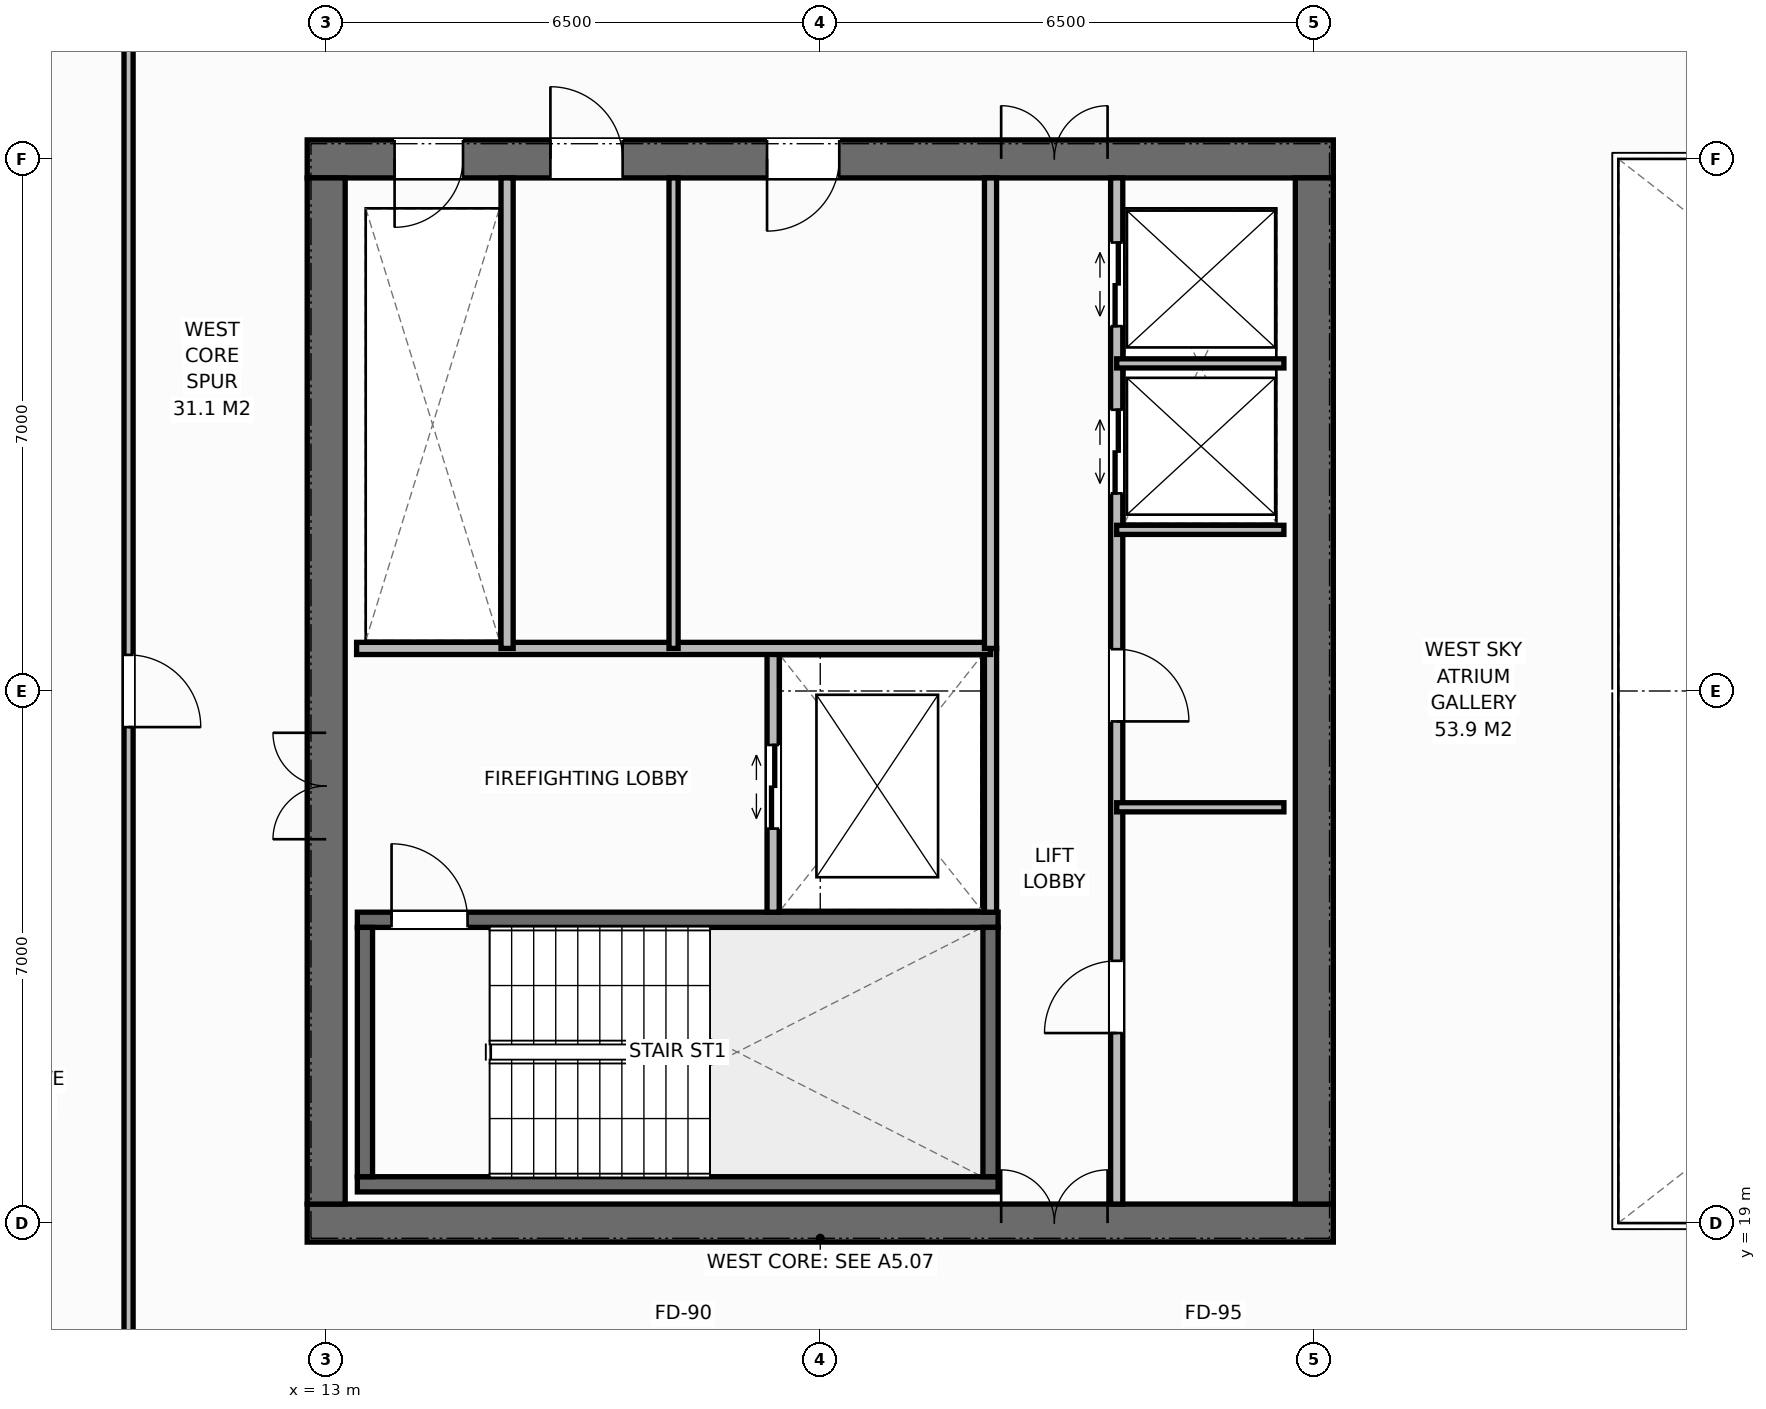
"""IFC4 building model, lengths in metres.
Left out: names, types, materials, properties, quantities, classifications, styles, units other than length and angle.
Written with IfcOpenShell. Run it as: python <this file> out.ifc"""

import sys

from ifc_helpers import new_model, si_unit, direction, frame, frame_2d, origin, place, context, subcontext, project, spatial, rectangle, extrude, element, fill, save


model = new_model("IFC4")
c1 = context("Model", 3, precision=1e-05, world=origin(), true_north=direction((0.0, 1.0)))
c2 = subcontext(c1, "Body", "Model", "MODEL_VIEW")
j1 = project(units=[si_unit("LENGTHUNIT", "METRE"), si_unit("PLANEANGLEUNIT", "RADIAN")], contexts=[c1])
p1 = place(None, origin())
s1 = spatial("IfcSite", under=j1, at=p1, CompositionType="ELEMENT")
p2 = place(p1, origin())
s2 = spatial("IfcBuilding", under=s1, at=p2, CompositionType="ELEMENT")
p3 = place(p2, frame((0.0, 0.0, 274.6)))
s3 = spatial("IfcBuildingStorey", under=s2, at=p3, CompositionType="ELEMENT", Elevation=274.6)
p4 = place(p3, frame((12.75, 19.0, 0.0), z_axis=(0.0, 0.0, 1.0), x_axis=(1.0, 0.0, 0.0)))
e1 = element("IfcWall", 1, at=p4, inside=s3, PredefinedType="SHEAR", context=c2, shape_type="SweptSolid", body=[
    extrude(rectangle(XDim=13.5, YDim=0.5, at=frame_2d((6.75, 0.0))), origin(), (0.0, 0.0, 1.0), 3.8),
])
p5 = place(p4, frame((9.13, 0.0, 0.0)))
e2 = element("IfcOpeningElement", 2, at=p5, cuts=e1, PredefinedType="OPENING", context=c2, shape_type="SweptSolid", body=[
    extrude(rectangle(XDim=1.4, YDim=2.2, at=frame_2d((0.7, 1.1))), frame((0.0, 0.26, 0.0), z_axis=(0.0, -1.0, 0.0), x_axis=(1.0, 0.0, 0.0)), (0.0, 0.0, 1.0), 0.52),
])
p6 = place(p3, frame((12.75, 33.0, 0.0), z_axis=(0.0, 0.0, 1.0), x_axis=(1.0, 0.0, 0.0)))
e3 = element("IfcWall", 3, at=p6, inside=s3, PredefinedType="SHEAR", context=c2, shape_type="SweptSolid", body=[
    extrude(rectangle(XDim=13.5, YDim=0.5, at=frame_2d((6.75, 0.0))), origin(), (0.0, 0.0, 1.0), 3.8),
])
p7 = place(p6, frame((1.15, 0.0, 0.0)))
e4 = element("IfcOpeningElement", 4, at=p7, cuts=e3, PredefinedType="OPENING", context=c2, shape_type="SweptSolid", body=[
    extrude(rectangle(XDim=0.9, YDim=2.15, at=frame_2d((0.45, 1.075))), frame((0.0, 0.26, 0.0), z_axis=(0.0, -1.0, 0.0), x_axis=(1.0, 0.0, 0.0)), (0.0, 0.0, 1.0), 0.52),
])
p8 = place(p6, frame((3.2, 0.0, 0.0)))
e5 = element("IfcOpeningElement", 5, at=p8, cuts=e3, PredefinedType="OPENING", context=c2, shape_type="SweptSolid", body=[
    extrude(rectangle(XDim=0.95, YDim=2.15, at=frame_2d((0.475, 1.075))), frame((0.0, 0.26, 0.0), z_axis=(0.0, -1.0, 0.0), x_axis=(1.0, 0.0, 0.0)), (0.0, 0.0, 1.0), 0.52),
])
p9 = place(p6, frame((6.05, 0.0, 0.0)))
e6 = element("IfcOpeningElement", 6, at=p9, cuts=e3, PredefinedType="OPENING", context=c2, shape_type="SweptSolid", body=[
    extrude(rectangle(XDim=0.95, YDim=2.15, at=frame_2d((0.475, 1.075))), frame((0.0, 0.26, 0.0), z_axis=(0.0, -1.0, 0.0), x_axis=(1.0, 0.0, 0.0)), (0.0, 0.0, 1.0), 0.52),
])
p10 = place(p6, frame((9.13, 0.0, 0.0)))
e7 = element("IfcOpeningElement", 7, at=p10, cuts=e3, PredefinedType="OPENING", context=c2, shape_type="SweptSolid", body=[
    extrude(rectangle(XDim=1.4, YDim=2.2, at=frame_2d((0.7, 1.1))), frame((0.0, 0.26, 0.0), z_axis=(0.0, -1.0, 0.0), x_axis=(1.0, 0.0, 0.0)), (0.0, 0.0, 1.0), 0.52),
])
p11 = place(p3, frame((13.0, 19.25, 0.0), z_axis=(0.0, 0.0, 1.0), x_axis=(0.0, 1.0, 0.0)))
e8 = element("IfcWall", 8, at=p11, inside=s3, PredefinedType="SHEAR", context=c2, shape_type="SweptSolid", body=[
    extrude(rectangle(XDim=13.5, YDim=0.5, at=frame_2d((6.75, 0.0))), origin(), (0.0, 0.0, 1.0), 3.8),
])
p12 = place(p11, frame((4.8, 0.0, 0.0)))
e9 = element("IfcOpeningElement", 9, at=p12, cuts=e8, PredefinedType="OPENING", context=c2, shape_type="SweptSolid", body=[
    extrude(rectangle(XDim=1.4, YDim=2.2, at=frame_2d((0.7, 1.1))), frame((0.0, 0.26, 0.0), z_axis=(0.0, -1.0, 0.0), x_axis=(1.0, 0.0, 0.0)), (0.0, 0.0, 1.0), 0.52),
])
p13 = place(p3, frame((26.0, 19.25, 0.0), z_axis=(0.0, 0.0, 1.0), x_axis=(0.0, 1.0, 0.0)))
e10 = element("IfcWall", 10, at=p13, inside=s3, PredefinedType="SHEAR", context=c2, shape_type="SweptSolid", body=[
    extrude(rectangle(XDim=13.5, YDim=0.5, at=frame_2d((6.75, 0.0))), origin(), (0.0, 0.0, 1.0), 3.8),
])
p14 = place(p3, frame((13.41, 19.51, 0.0), z_axis=(0.0, 0.0, 1.0), x_axis=(1.0, 0.0, 0.0)))
e11 = element("IfcWall", 11, at=p14, inside=s3, PredefinedType="SHEAR", context=c2, shape_type="SweptSolid", body=[
    extrude(rectangle(XDim=8.43, YDim=0.2, at=frame_2d((4.215, 0.0))), origin(), (0.0, 0.0, 1.0), 3.8),
])
p15 = place(p3, frame((13.41, 22.99, 0.0), z_axis=(0.0, 0.0, 1.0), x_axis=(1.0, 0.0, 0.0)))
e12 = element("IfcWall", 12, at=p15, inside=s3, PredefinedType="SHEAR", context=c2, shape_type="SweptSolid", body=[
    extrude(rectangle(XDim=8.43, YDim=0.2, at=frame_2d((4.215, 0.0))), origin(), (0.0, 0.0, 1.0), 3.8),
])
p16 = place(p15, frame((0.45, 0.0, 0.0)))
e13 = element("IfcOpeningElement", 13, at=p16, cuts=e12, PredefinedType="OPENING", context=c2, shape_type="SweptSolid", body=[
    extrude(rectangle(XDim=1.0, YDim=2.15, at=frame_2d((0.5, 1.075))), frame((0.0, 0.11, 0.0), z_axis=(0.0, -1.0, 0.0), x_axis=(1.0, 0.0, 0.0)), (0.0, 0.0, 1.0), 0.22),
])
for number, where, z_axis, x_axis in (
    (14, (13.51, 19.61, 0.0), (0.0, 0.0, 1.0), (0.0, 1.0, 0.0)),
    (15, (21.74, 19.61, 0.0), (0.0, 0.0, 1.0), (0.0, 1.0, 0.0)),
):
    element("IfcWall", number, at=place(p3, frame(where, z_axis=z_axis, x_axis=x_axis)), inside=s3, PredefinedType="SHEAR", context=c2, shape_type="SweptSolid", body=[
        extrude(rectangle(XDim=3.28, YDim=0.2, at=frame_2d((1.64, 0.0))), origin(), (0.0, 0.0, 1.0), 3.8),
    ])
p17 = place(p3, frame((21.74, 23.09, 0.0), z_axis=(0.0, 0.0, 1.0), x_axis=(0.0, 1.0, 0.0)))
e16 = element("IfcWall", 16, at=p17, inside=s3, PredefinedType="STANDARD", context=c2, shape_type="SweptSolid", body=[
    extrude(rectangle(XDim=3.47, YDim=0.16, at=frame_2d((1.735, 0.0))), origin(), (0.0, 0.0, 1.0), 3.588),
])
p18 = place(p3, frame((18.88, 23.09, 0.0), z_axis=(0.0, 0.0, 1.0), x_axis=(0.0, 1.0, 0.0)))
e17 = element("IfcWall", 17, at=p18, inside=s3, PredefinedType="STANDARD", context=c2, shape_type="SweptSolid", body=[
    extrude(rectangle(XDim=3.47, YDim=0.16, at=frame_2d((1.735, 0.0))), origin(), (0.0, 0.0, 1.0), 3.588),
])
p19 = place(p18, frame((1.1, 0.0, 0.0)))
e18 = element("IfcOpeningElement", 18, at=p19, cuts=e17, PredefinedType="OPENING", context=c2, shape_type="SweptSolid", body=[
    extrude(rectangle(XDim=1.1, YDim=2.2, at=frame_2d((0.55, 1.1))), frame((0.0, 0.09, 0.0), z_axis=(0.0, -1.0, 0.0), x_axis=(1.0, 0.0, 0.0)), (0.0, 0.0, 1.0), 0.18),
])
p20 = place(p3, frame((13.4, 26.56, 0.0), z_axis=(0.0, 0.0, 1.0), x_axis=(1.0, 0.0, 0.0)))
e19 = element("IfcWall", 19, at=p20, inside=s3, PredefinedType="STANDARD", context=c2, shape_type="SweptSolid", body=[
    extrude(rectangle(XDim=8.34, YDim=0.16, at=frame_2d((4.17, 0.0))), origin(), (0.0, 0.0, 1.0), 3.588),
])
p21 = place(p3, frame((15.38, 26.56, 0.0), z_axis=(0.0, 0.0, 1.0), x_axis=(0.0, 1.0, 0.0)))
e20 = element("IfcWall", 20, at=p21, inside=s3, PredefinedType="STANDARD", context=c2, shape_type="SweptSolid", body=[
    extrude(rectangle(XDim=6.19, YDim=0.16, at=frame_2d((3.095, 0.0))), origin(), (0.0, 0.0, 1.0), 3.588),
])
p22 = place(p3, frame((17.57, 26.56, 0.0), z_axis=(0.0, 0.0, 1.0), x_axis=(0.0, 1.0, 0.0)))
e21 = element("IfcWall", 21, at=p22, inside=s3, PredefinedType="PARTITIONING", context=c2, shape_type="SweptSolid", body=[
    extrude(rectangle(XDim=6.19, YDim=0.12, at=frame_2d((3.095, 0.0))), origin(), (0.0, 0.0, 1.0), 3.588),
])
p23 = place(p3, frame((21.74, 26.56, 0.0), z_axis=(0.0, 0.0, 1.0), x_axis=(0.0, 1.0, 0.0)))
e22 = element("IfcWall", 22, at=p23, inside=s3, PredefinedType="STANDARD", context=c2, shape_type="SweptSolid", body=[
    extrude(rectangle(XDim=6.19, YDim=0.16, at=frame_2d((3.095, 0.0))), origin(), (0.0, 0.0, 1.0), 3.588),
])
p24 = place(p3, frame((23.4, 19.25, 0.0), z_axis=(0.0, 0.0, 1.0), x_axis=(0.0, 1.0, 0.0)))
e23 = element("IfcWall", 23, at=p24, inside=s3, PredefinedType="STANDARD", context=c2, shape_type="SweptSolid", body=[
    extrude(rectangle(XDim=13.5, YDim=0.16, at=frame_2d((6.75, 0.0))), origin(), (0.0, 0.0, 1.0), 3.588),
])
p25 = place(p24, frame((2.25, 0.0, 0.0)))
e24 = element("IfcOpeningElement", 24, at=p25, cuts=e23, PredefinedType="OPENING", context=c2, shape_type="SweptSolid", body=[
    extrude(rectangle(XDim=0.95, YDim=2.15, at=frame_2d((0.475, 1.075))), frame((0.0, 0.09, 0.0), z_axis=(0.0, -1.0, 0.0), x_axis=(1.0, 0.0, 0.0)), (0.0, 0.0, 1.0), 0.18),
])
p26 = place(p24, frame((6.35, 0.0, 0.0)))
e25 = element("IfcOpeningElement", 25, at=p26, cuts=e23, PredefinedType="OPENING", context=c2, shape_type="SweptSolid", body=[
    extrude(rectangle(XDim=0.95, YDim=2.15, at=frame_2d((0.475, 1.075))), frame((0.0, 0.09, 0.0), z_axis=(0.0, -1.0, 0.0), x_axis=(1.0, 0.0, 0.0)), (0.0, 0.0, 1.0), 0.18),
])
p27 = place(p24, frame((9.35, 0.0, 0.0)))
e26 = element("IfcOpeningElement", 26, at=p27, cuts=e23, PredefinedType="OPENING", context=c2, shape_type="SweptSolid", body=[
    extrude(rectangle(XDim=1.1, YDim=2.2, at=frame_2d((0.55, 1.1))), frame((0.0, 0.09, 0.0), z_axis=(0.0, -1.0, 0.0), x_axis=(1.0, 0.0, 0.0)), (0.0, 0.0, 1.0), 0.18),
])
p28 = place(p24, frame((11.55, 0.0, 0.0)))
e27 = element("IfcOpeningElement", 27, at=p28, cuts=e23, PredefinedType="OPENING", context=c2, shape_type="SweptSolid", body=[
    extrude(rectangle(XDim=1.1, YDim=2.2, at=frame_2d((0.55, 1.1))), frame((0.0, 0.09, 0.0), z_axis=(0.0, -1.0, 0.0), x_axis=(1.0, 0.0, 0.0)), (0.0, 0.0, 1.0), 0.18),
])
for number, where, z_axis, x_axis in (
    (28, (23.4, 24.47, 0.0), (0.0, 0.0, 1.0), (1.0, 0.0, 0.0)),
    (29, (23.4, 28.12, 0.0), (0.0, 0.0, 1.0), (1.0, 0.0, 0.0)),
    (30, (23.4, 30.31, 0.0), (0.0, 0.0, 1.0), (1.0, 0.0, 0.0)),
):
    element("IfcWall", number, at=place(p3, frame(where, z_axis=z_axis, x_axis=x_axis)), inside=s3, PredefinedType="PARTITIONING", context=c2, shape_type="SweptSolid", body=[
        extrude(rectangle(XDim=2.2, YDim=0.12, at=frame_2d((1.1, 0.0))), origin(), (0.0, 0.0, 1.0), 3.588),
    ])
p29 = place(p3, frame((10.4, 16.5, 0.0), z_axis=(0.0, 0.0, 1.0), x_axis=(0.0, 1.0, 0.0)))
e31 = element("IfcWall", 31, at=p29, inside=s3, PredefinedType="PARTITIONING", context=c2, shape_type="SweptSolid", body=[
    extrude(rectangle(XDim=19.0, YDim=0.12, at=frame_2d((9.5, 0.0))), origin(), (0.0, 0.0, 1.0), 3.588),
])
p30 = place(p29, frame((9.025, 0.0, 0.0)))
e32 = element("IfcOpeningElement", 32, at=p30, cuts=e31, PredefinedType="OPENING", context=c2, shape_type="SweptSolid", body=[
    extrude(rectangle(XDim=0.95, YDim=2.15, at=frame_2d((0.475, 1.075))), frame((0.0, 0.07, 0.0), z_axis=(0.0, -1.0, 0.0), x_axis=(1.0, 0.0, 0.0)), (0.0, 0.0, 1.0), 0.14),
])
p31 = place(p16, origin())
e33 = element("IfcDoor", 33, at=p31, inside=s3, OperationType="SINGLE_SWING_LEFT", PredefinedType="DOOR", context=c2, shape_type="SweptSolid", body=[
    extrude(rectangle(XDim=1.0, YDim=2.15, at=frame_2d((0.5, 1.075))), frame((0.0, 0.025, 0.0), z_axis=(0.0, -1.0, 0.0), x_axis=(1.0, 0.0, 0.0)), (0.0, 0.0, 1.0), 0.05),
])
fill(e13, e33)
p32 = place(p12, origin())
e34 = element("IfcDoor", 34, at=p32, inside=s3, OperationType="DOUBLE_DOOR_SINGLE_SWING", PredefinedType="DOOR", context=c2, shape_type="SweptSolid", body=[
    extrude(rectangle(XDim=1.4, YDim=2.2, at=frame_2d((0.7, 1.1))), frame((0.0, 0.025, 0.0), z_axis=(0.0, -1.0, 0.0), x_axis=(1.0, 0.0, 0.0)), (0.0, 0.0, 1.0), 0.05),
])
fill(e9, e34)
p33 = place(p19, origin())
e35 = element("IfcDoor", 35, at=p33, inside=s3, OperationType="DOUBLE_DOOR_SLIDING", PredefinedType="DOOR", context=c2, shape_type="SweptSolid", body=[
    extrude(rectangle(XDim=1.1, YDim=2.2, at=frame_2d((0.55, 1.1))), frame((0.0, 0.025, 0.0), z_axis=(0.0, -1.0, 0.0), x_axis=(1.0, 0.0, 0.0)), (0.0, 0.0, 1.0), 0.05),
])
fill(e18, e35)
p34 = place(p7, origin())
e36 = element("IfcDoor", 36, at=p34, inside=s3, OperationType="SINGLE_SWING_RIGHT", PredefinedType="DOOR", context=c2, shape_type="SweptSolid", body=[
    extrude(rectangle(XDim=0.9, YDim=2.15, at=frame_2d((0.45, 1.075))), frame((0.0, -0.025, 0.0), z_axis=(0.0, -1.0, 0.0), x_axis=(1.0, 0.0, 0.0)), (0.0, 0.0, 1.0), 0.05),
])
fill(e4, e36)
p35 = place(p8, origin())
e37 = element("IfcDoor", 37, at=p35, inside=s3, OperationType="SINGLE_SWING_LEFT", PredefinedType="DOOR", context=c2, shape_type="SweptSolid", body=[
    extrude(rectangle(XDim=0.95, YDim=2.15, at=frame_2d((0.475, 1.075))), frame((0.0, -0.025, 0.0), z_axis=(0.0, -1.0, 0.0), x_axis=(1.0, 0.0, 0.0)), (0.0, 0.0, 1.0), 0.05),
])
fill(e5, e37)
p36 = place(p9, origin())
e38 = element("IfcDoor", 38, at=p36, inside=s3, OperationType="SINGLE_SWING_RIGHT", PredefinedType="DOOR", context=c2, shape_type="SweptSolid", body=[
    extrude(rectangle(XDim=0.95, YDim=2.15, at=frame_2d((0.475, 1.075))), frame((0.0, -0.025, 0.0), z_axis=(0.0, -1.0, 0.0), x_axis=(1.0, 0.0, 0.0)), (0.0, 0.0, 1.0), 0.05),
])
fill(e6, e38)
p37 = place(p5, origin())
e39 = element("IfcDoor", 39, at=p37, inside=s3, OperationType="DOUBLE_DOOR_SINGLE_SWING", PredefinedType="DOOR", context=c2, shape_type="SweptSolid", body=[
    extrude(rectangle(XDim=1.4, YDim=2.2, at=frame_2d((0.7, 1.1))), frame((0.0, 0.075, 0.0), z_axis=(0.0, -1.0, 0.0), x_axis=(1.0, 0.0, 0.0)), (0.0, 0.0, 1.0), 0.05),
])
fill(e2, e39)
p38 = place(p10, origin())
e40 = element("IfcDoor", 40, at=p38, inside=s3, OperationType="DOUBLE_DOOR_SINGLE_SWING", PredefinedType="DOOR", context=c2, shape_type="SweptSolid", body=[
    extrude(rectangle(XDim=1.4, YDim=2.2, at=frame_2d((0.7, 1.1))), frame((0.0, -0.025, 0.0), z_axis=(0.0, -1.0, 0.0), x_axis=(1.0, 0.0, 0.0)), (0.0, 0.0, 1.0), 0.05),
])
fill(e7, e40)
p39 = place(p25, origin())
e41 = element("IfcDoor", 41, at=p39, inside=s3, OperationType="SINGLE_SWING_LEFT", PredefinedType="DOOR", context=c2, shape_type="SweptSolid", body=[
    extrude(rectangle(XDim=0.95, YDim=2.15, at=frame_2d((0.475, 1.075))), frame((0.0, 0.025, 0.0), z_axis=(0.0, -1.0, 0.0), x_axis=(1.0, 0.0, 0.0)), (0.0, 0.0, 1.0), 0.05),
])
fill(e24, e41)
p40 = place(p26, origin())
e42 = element("IfcDoor", 42, at=p40, inside=s3, OperationType="SINGLE_SWING_RIGHT", PredefinedType="DOOR", context=c2, shape_type="SweptSolid", body=[
    extrude(rectangle(XDim=0.95, YDim=2.15, at=frame_2d((0.475, 1.075))), frame((0.0, 0.025, 0.0), z_axis=(0.0, -1.0, 0.0), x_axis=(1.0, 0.0, 0.0)), (0.0, 0.0, 1.0), 0.05),
])
fill(e25, e42)
p41 = place(p27, origin())
e43 = element("IfcDoor", 43, at=p41, inside=s3, OperationType="DOUBLE_DOOR_SLIDING", PredefinedType="DOOR", context=c2, shape_type="SweptSolid", body=[
    extrude(rectangle(XDim=1.1, YDim=2.2, at=frame_2d((0.55, 1.1))), frame((0.0, 0.025, 0.0), z_axis=(0.0, -1.0, 0.0), x_axis=(1.0, 0.0, 0.0)), (0.0, 0.0, 1.0), 0.05),
])
fill(e26, e43)
p42 = place(p28, origin())
e44 = element("IfcDoor", 44, at=p42, inside=s3, OperationType="DOUBLE_DOOR_SLIDING", PredefinedType="DOOR", context=c2, shape_type="SweptSolid", body=[
    extrude(rectangle(XDim=1.1, YDim=2.2, at=frame_2d((0.55, 1.1))), frame((0.0, 0.025, 0.0), z_axis=(0.0, -1.0, 0.0), x_axis=(1.0, 0.0, 0.0)), (0.0, 0.0, 1.0), 0.05),
])
fill(e27, e44)
p43 = place(p30, origin())
e45 = element("IfcDoor", 45, at=p43, inside=s3, OperationType="SINGLE_SWING_RIGHT", PredefinedType="DOOR", context=c2, shape_type="SweptSolid", body=[
    extrude(rectangle(XDim=0.95, YDim=2.15, at=frame_2d((0.475, 1.075))), frame((0.0, 0.025, 0.0), z_axis=(0.0, -1.0, 0.0), x_axis=(1.0, 0.0, 0.0)), (0.0, 0.0, 1.0), 0.05),
])
fill(e32, e45)
save(model, sys.argv[1])
